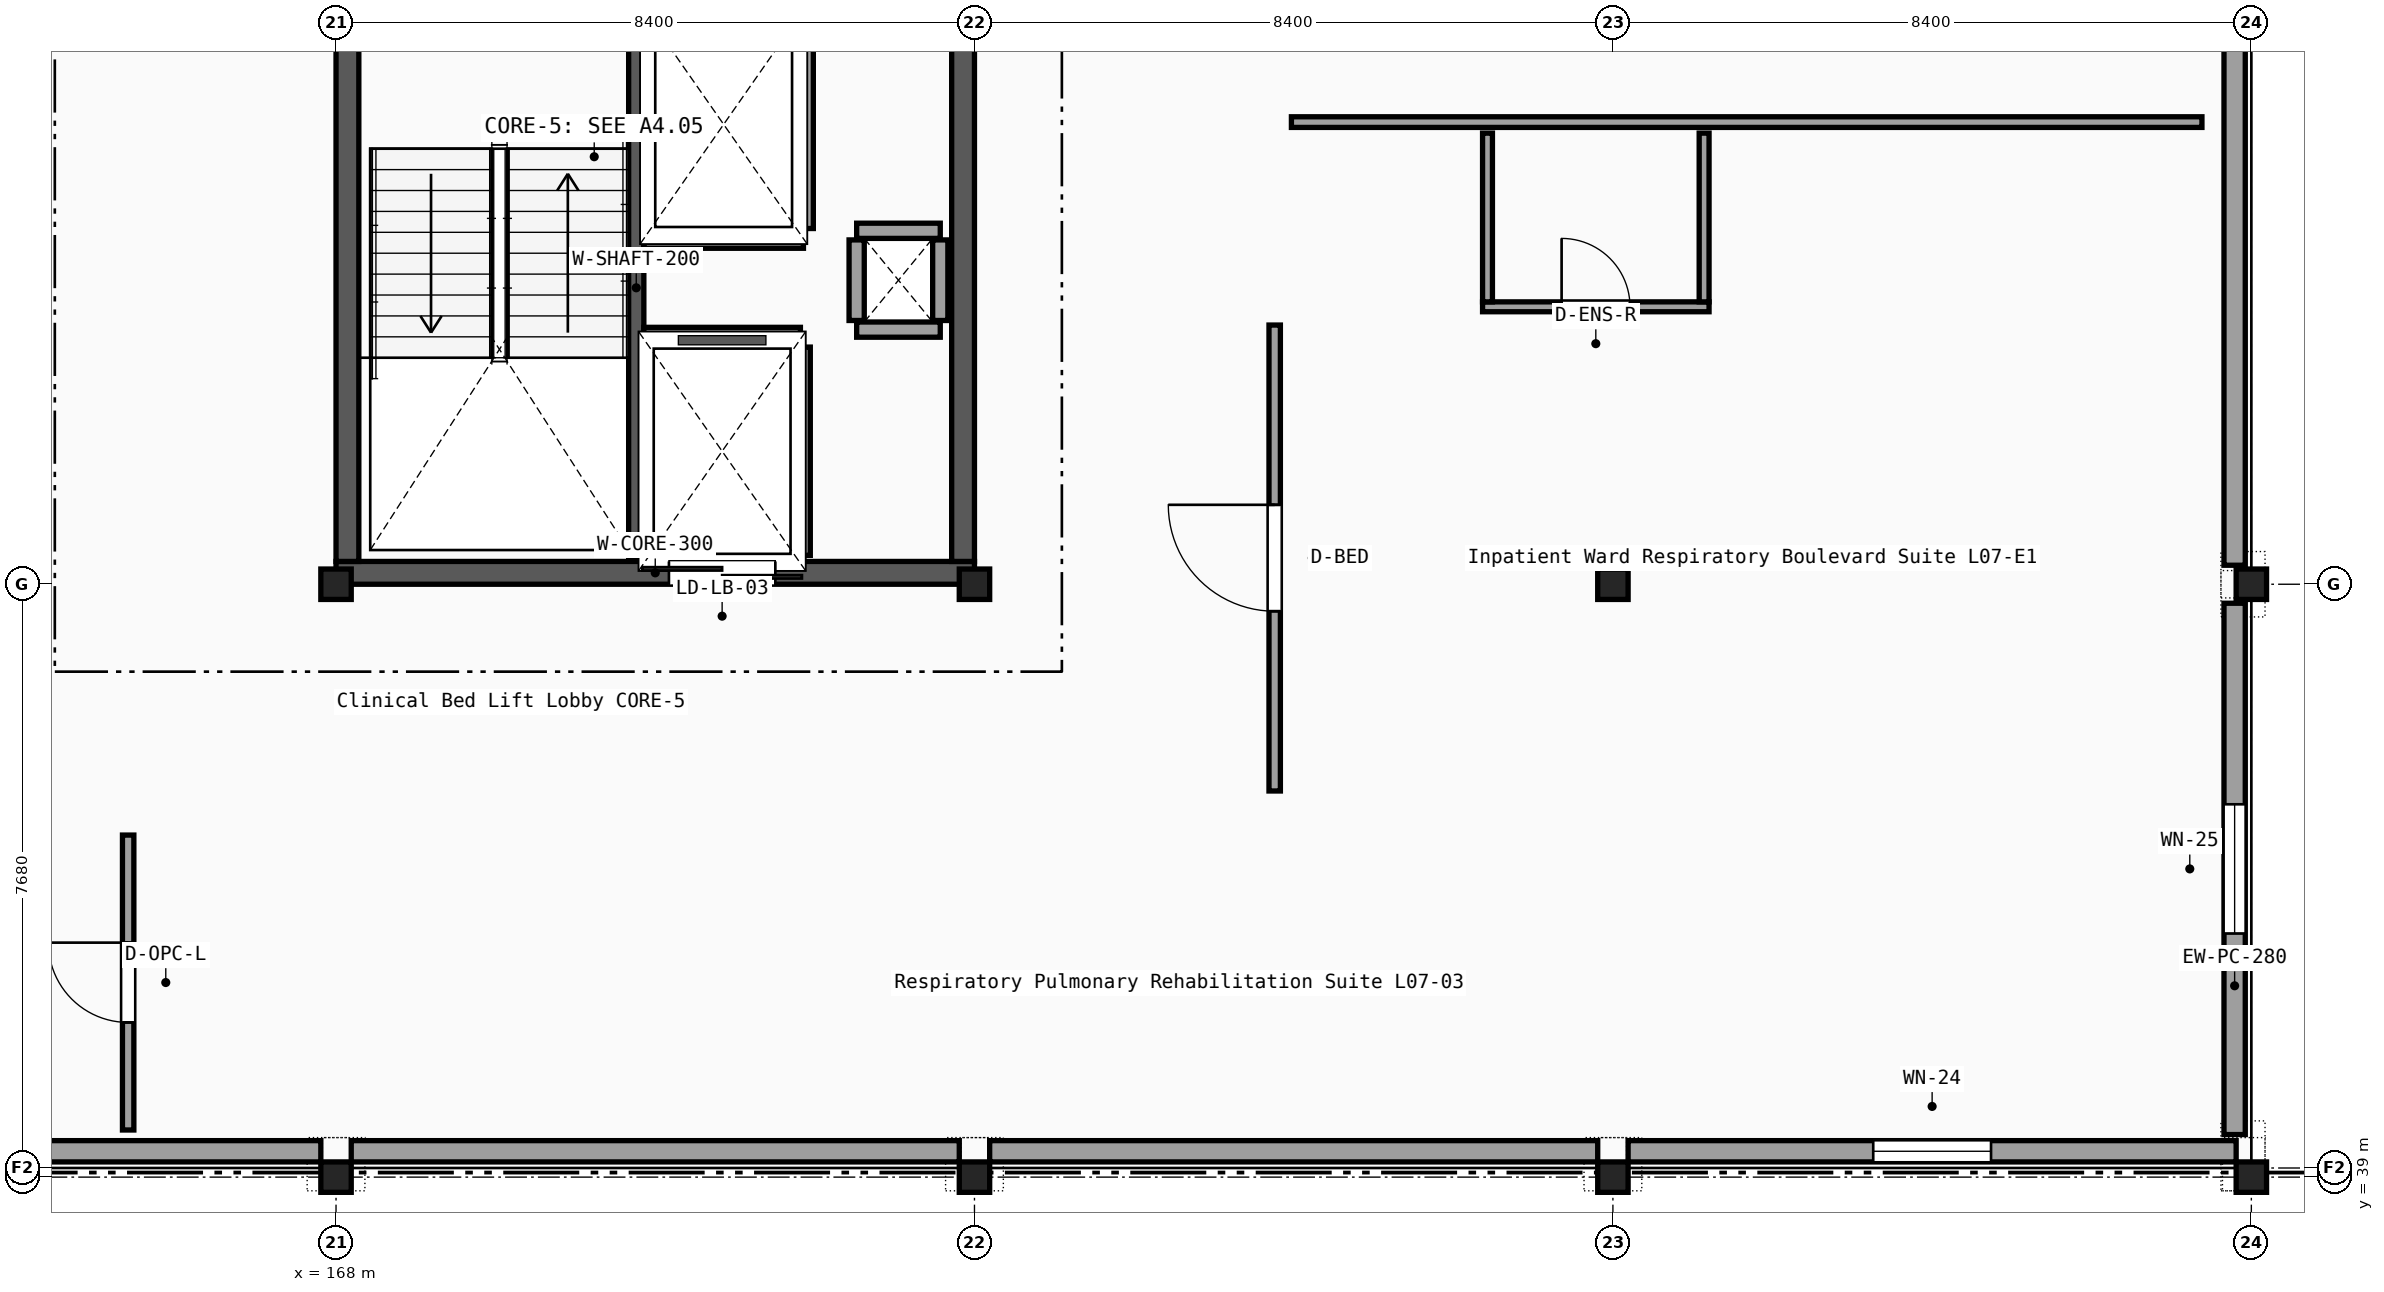
"""IFC4 building model, lengths in metres.
Left out: names, types, materials, properties, quantities, classifications, styles, units other than length and angle.
Written with IfcOpenShell. Run it as: python <this file> out.ifc"""

import sys

from ifc_helpers import new_model, si_unit, direction, frame, frame_2d, origin, origin_2d, place, context, subcontext, project, spatial, rectangle, i_section, extrude, element, fill, save


model = new_model("IFC4")
c1 = context("Model", 3, precision=1e-05, world=origin(), true_north=direction((0.0, 1.0)))
c2 = subcontext(c1, "Body", "Model", "MODEL_VIEW")
j1 = project(units=[si_unit("LENGTHUNIT", "METRE"), si_unit("PLANEANGLEUNIT", "RADIAN")], contexts=[c1])
p1 = place(None, origin())
s1 = spatial("IfcSite", under=j1, at=p1, CompositionType="ELEMENT")
p2 = place(p1, origin())
s2 = spatial("IfcBuilding", under=s1, at=p2, CompositionType="ELEMENT")
p3 = place(p2, frame((0.0, 0.0, 31.05)))
s3 = spatial("IfcBuildingStorey", under=s2, at=p3, CompositionType="ELEMENT", Elevation=31.05)
for number, where, z_axis, x_axis in (
    (1, (168.0, 39.0, 0.0), (0.0, 0.0, 1.0), (1.0, 0.0, 0.0)),
    (2, (168.0, 46.8, 0.0), (0.0, 0.0, 1.0), (1.0, 0.0, 0.0)),
    (3, (176.4, 39.0, 0.0), (0.0, 0.0, 1.0), (1.0, 0.0, 0.0)),
    (4, (176.4, 46.8, 0.0), (0.0, 0.0, 1.0), (1.0, 0.0, 0.0)),
    (5, (184.8, 39.0, 0.0), (0.0, 0.0, 1.0), (1.0, 0.0, 0.0)),
    (6, (184.8, 46.8, 0.0), (0.0, 0.0, 1.0), (1.0, 0.0, 0.0)),
    (7, (193.2, 39.0, 0.0), (0.0, 0.0, 1.0), (1.0, 0.0, 0.0)),
    (8, (193.2, 46.8, 0.0), (0.0, 0.0, 1.0), (1.0, 0.0, 0.0)),
):
    element("IfcColumn", number, at=place(p3, frame(where, z_axis=z_axis, x_axis=x_axis)), inside=s3, PredefinedType="COLUMN", context=c2, shape_type="SweptSolid", body=[
        extrude(i_section(OverallWidth=0.3, OverallDepth=0.4, WebThickness=0.013, FlangeThickness=0.024, FilletRadius=0.027, at=origin_2d()), origin(), (0.0, 0.0, 1.0), 4.05),
    ])
p4 = place(p3, frame((159.925, 39.34, 0.0), z_axis=(0.0, 0.0, 1.0), x_axis=(1.0, 0.0, 0.0)))
e9 = element("IfcWall", 9, at=p4, inside=s3, PredefinedType="SOLIDWALL", context=c2, shape_type="SweptSolid", body=[
    extrude(rectangle(XDim=7.875, YDim=0.28, at=frame_2d((3.938, 0.0))), origin(), (0.0, 0.0, 1.0), 3.34),
])
for number, where, z_axis, x_axis in (
    (10, (168.2, 39.34, 0.0), (0.0, 0.0, 1.0), (1.0, 0.0, 0.0)),
    (11, (176.6, 39.34, 0.0), (0.0, 0.0, 1.0), (1.0, 0.0, 0.0)),
):
    element("IfcWall", number, at=place(p3, frame(where, z_axis=z_axis, x_axis=x_axis)), inside=s3, PredefinedType="SOLIDWALL", context=c2, shape_type="SweptSolid", body=[
        extrude(rectangle(XDim=8.0, YDim=0.28, at=frame_2d((4.0, 0.0))), origin(), (0.0, 0.0, 1.0), 3.34),
    ])
p5 = place(p3, frame((185.0, 39.34, 0.0), z_axis=(0.0, 0.0, 1.0), x_axis=(1.0, 0.0, 0.0)))
e12 = element("IfcWall", 12, at=p5, inside=s3, PredefinedType="SOLIDWALL", context=c2, shape_type="SweptSolid", body=[
    extrude(rectangle(XDim=8.0, YDim=0.28, at=frame_2d((4.0, 0.0))), origin(), (0.0, 0.0, 1.0), 3.34),
])
p6 = place(p5, frame((3.225, 0.0, 0.8)))
e13 = element("IfcOpeningElement", 13, at=p6, cuts=e12, PredefinedType="OPENING", context=c2, shape_type="SweptSolid", body=[
    extrude(rectangle(XDim=1.55, YDim=1.7, at=frame_2d((0.775, 0.85))), frame((0.0, 0.15, 0.0), z_axis=(0.0, -1.0, 0.0), x_axis=(1.0, 0.0, 0.0)), (0.0, 0.0, 1.0), 0.3),
])
p7 = place(p3, frame((192.98, 39.56, 0.0), z_axis=(0.0, 0.0, 1.0), x_axis=(0.0, 1.0, 0.0)))
e14 = element("IfcWall", 14, at=p7, inside=s3, PredefinedType="SOLIDWALL", context=c2, shape_type="SweptSolid", body=[
    extrude(rectangle(XDim=6.99, YDim=0.28, at=frame_2d((3.495, 0.0))), origin(), (0.0, 0.0, 1.0), 3.44),
])
p8 = place(p7, frame((2.645, 0.0, 0.95)))
e15 = element("IfcOpeningElement", 15, at=p8, cuts=e14, PredefinedType="OPENING", context=c2, shape_type="SweptSolid", body=[
    extrude(rectangle(XDim=1.7, YDim=1.55, at=frame_2d((0.85, 0.775))), frame((0.0, 0.15, 0.0), z_axis=(0.0, -1.0, 0.0), x_axis=(1.0, 0.0, 0.0)), (0.0, 0.0, 1.0), 0.3),
])
p9 = place(p3, frame((192.98, 47.05, 0.0), z_axis=(0.0, 0.0, 1.0), x_axis=(0.0, 1.0, 0.0)))
e16 = element("IfcWall", 16, at=p9, inside=s3, PredefinedType="SOLIDWALL", context=c2, shape_type="SweptSolid", body=[
    extrude(rectangle(XDim=7.3, YDim=0.28, at=frame_2d((3.65, 0.0))), origin(), (0.0, 0.0, 1.0), 3.44),
])
p10 = place(p3, frame((168.0, 46.95, 0.0), z_axis=(0.0, 0.0, 1.0), x_axis=(1.0, 0.0, 0.0)))
e17 = element("IfcWall", 17, at=p10, inside=s3, PredefinedType="SHEAR", context=c2, shape_type="SweptSolid", body=[
    extrude(rectangle(XDim=8.4, YDim=0.3, at=frame_2d((4.2, 0.0))), origin(), (0.0, 0.0, 1.0), 3.81),
])
p11 = place(p10, frame((4.38, 0.0, 0.0)))
e18 = element("IfcOpeningElement", 18, at=p11, cuts=e17, PredefinedType="OPENING", context=c2, shape_type="SweptSolid", body=[
    extrude(rectangle(XDim=1.4, YDim=2.2, at=frame_2d((0.7, 1.1))), frame((0.0, 0.16, 0.0), z_axis=(0.0, -1.0, 0.0), x_axis=(1.0, 0.0, 0.0)), (0.0, 0.0, 1.0), 0.32),
])
for number, where, z_axis, x_axis in (
    (19, (168.15, 47.1, 0.0), (0.0, 0.0, 1.0), (0.0, 1.0, 0.0)),
    (20, (176.25, 47.1, 0.0), (0.0, 0.0, 1.0), (0.0, 1.0, 0.0)),
):
    element("IfcWall", number, at=place(p3, frame(where, z_axis=z_axis, x_axis=x_axis)), inside=s3, PredefinedType="SHEAR", context=c2, shape_type="SweptSolid", body=[
        extrude(rectangle(XDim=7.2, YDim=0.3, at=frame_2d((3.6, 0.0))), origin(), (0.0, 0.0, 1.0), 3.81),
    ])
p12 = place(p3, frame((171.95, 47.12, 0.0), z_axis=(0.0, 0.0, 1.0), x_axis=(0.0, 1.0, 0.0)))
e21 = element("IfcWall", 21, at=p12, inside=s3, PredefinedType="SHEAR", context=c2, shape_type="SweptSolid", body=[
    extrude(rectangle(XDim=7.16, YDim=0.2, at=frame_2d((3.58, 0.0))), origin(), (0.0, 0.0, 1.0), 3.81),
])
for number, where, z_axis, x_axis in (
    (22, (174.85, 50.15, 0.0), (0.0, 0.0, 1.0), (1.0, 0.0, 0.0)),
    (23, (174.85, 51.45, 0.0), (0.0, 0.0, 1.0), (1.0, 0.0, 0.0)),
):
    element("IfcWall", number, at=place(p3, frame(where, z_axis=z_axis, x_axis=x_axis)), inside=s3, PredefinedType="PARTITIONING", context=c2, shape_type="SweptSolid", body=[
        extrude(rectangle(XDim=1.1, YDim=0.2, at=frame_2d((0.55, 0.0))), origin(), (0.0, 0.0, 1.0), 3.34),
    ])
for number, where, z_axis, x_axis in (
    (24, (174.85, 50.27, 0.0), (0.0, 0.0, 1.0), (0.0, 1.0, 0.0)),
    (25, (175.95, 50.27, 0.0), (0.0, 0.0, 1.0), (0.0, 1.0, 0.0)),
):
    element("IfcWall", number, at=place(p3, frame(where, z_axis=z_axis, x_axis=x_axis)), inside=s3, PredefinedType="PARTITIONING", context=c2, shape_type="SweptSolid", body=[
        extrude(rectangle(XDim=1.06, YDim=0.2, at=frame_2d((0.53, 0.0))), origin(), (0.0, 0.0, 1.0), 3.34),
    ])
p13 = place(p3, frame((174.18, 51.48, 0.0), z_axis=(0.0, 0.0, 1.0), x_axis=(0.0, 1.0, 0.0)))
e26 = element("IfcWall", 26, at=p13, inside=s3, PredefinedType="PARTITIONING", context=c2, shape_type="SweptSolid", body=[
    extrude(rectangle(XDim=2.74, YDim=0.2, at=frame_2d((1.37, 0.0))), origin(), (0.0, 0.0, 1.0), 3.34),
])
p14 = place(p3, frame((172.05, 51.32, 0.0), z_axis=(0.0, 0.0, 1.0), x_axis=(1.0, 0.0, 0.0)))
e27 = element("IfcWall", 27, at=p14, inside=s3, PredefinedType="PARTITIONING", context=c2, shape_type="SweptSolid", body=[
    extrude(rectangle(XDim=2.1, YDim=0.2, at=frame_2d((1.05, 0.0))), origin(), (0.0, 0.0, 1.0), 3.34),
])
p15 = place(p3, frame((174.14, 47.18, 0.0), z_axis=(0.0, 0.0, 1.0), x_axis=(0.0, 1.0, 0.0)))
e28 = element("IfcWall", 28, at=p15, inside=s3, PredefinedType="PARTITIONING", context=c2, shape_type="SweptSolid", body=[
    extrude(rectangle(XDim=2.74, YDim=0.2, at=frame_2d((1.37, 0.0))), origin(), (0.0, 0.0, 1.0), 3.34),
])
p16 = place(p3, frame((172.05, 50.08, 0.0), z_axis=(0.0, 0.0, 1.0), x_axis=(1.0, 0.0, 0.0)))
e29 = element("IfcWall", 29, at=p16, inside=s3, PredefinedType="PARTITIONING", context=c2, shape_type="SweptSolid", body=[
    extrude(rectangle(XDim=2.06, YDim=0.2, at=frame_2d((1.03, 0.0))), origin(), (0.0, 0.0, 1.0), 3.34),
])
p17 = place(p3, frame((165.265, 39.62, 0.0), z_axis=(0.0, 0.0, 1.0), x_axis=(0.0, 1.0, 0.0)))
e30 = element("IfcWall", 30, at=p17, inside=s3, PredefinedType="PARTITIONING", context=c2, shape_type="SweptSolid", body=[
    extrude(rectangle(XDim=3.88, YDim=0.15, at=frame_2d((1.94, 0.0))), origin(), (0.0, 0.0, 1.0), 3.77),
])
p18 = place(p17, frame((1.415, 0.0, 0.0)))
e31 = element("IfcOpeningElement", 31, at=p18, cuts=e30, PredefinedType="OPENING", context=c2, shape_type="SweptSolid", body=[
    extrude(rectangle(XDim=1.05, YDim=2.15, at=frame_2d((0.525, 1.075))), frame((0.0, 0.085, 0.0), z_axis=(0.0, -1.0, 0.0), x_axis=(1.0, 0.0, 0.0)), (0.0, 0.0, 1.0), 0.17),
])
p19 = place(p3, frame((180.35, 44.08, 0.0), z_axis=(0.0, 0.0, 1.0), x_axis=(0.0, 1.0, 0.0)))
e32 = element("IfcWall", 32, at=p19, inside=s3, PredefinedType="PARTITIONING", context=c2, shape_type="SweptSolid", body=[
    extrude(rectangle(XDim=6.13, YDim=0.15, at=frame_2d((3.065, 0.0))), origin(), (0.0, 0.0, 1.0), 3.34),
])
p20 = place(p19, frame((2.365, 0.0, 0.0)))
e33 = element("IfcOpeningElement", 33, at=p20, cuts=e32, PredefinedType="OPENING", context=c2, shape_type="SweptSolid", body=[
    extrude(rectangle(XDim=1.4, YDim=2.2, at=frame_2d((0.7, 1.1))), frame((0.0, 0.085, 0.0), z_axis=(0.0, -1.0, 0.0), x_axis=(1.0, 0.0, 0.0)), (0.0, 0.0, 1.0), 0.17),
])
p21 = place(p3, frame((180.57, 52.88, 0.0), z_axis=(0.0, 0.0, 1.0), x_axis=(1.0, 0.0, 0.0)))
e34 = element("IfcWall", 34, at=p21, inside=s3, PredefinedType="PARTITIONING", context=c2, shape_type="SweptSolid", body=[
    extrude(rectangle(XDim=11.98, YDim=0.14, at=frame_2d((5.99, 0.0))), origin(), (0.0, 0.0, 1.0), 3.55),
])
p22 = place(p3, frame((183.085, 50.45, 0.0), z_axis=(0.0, 0.0, 1.0), x_axis=(1.0, 0.0, 0.0)))
e35 = element("IfcWall", 35, at=p22, inside=s3, PredefinedType="PARTITIONING", context=c2, shape_type="SweptSolid", body=[
    extrude(rectangle(XDim=2.98, YDim=0.13, at=frame_2d((1.49, 0.0))), origin(), (0.0, 0.0, 1.0), 3.55),
])
p23 = place(p22, frame((1.04, 0.0, 0.0)))
e36 = element("IfcOpeningElement", 36, at=p23, cuts=e35, PredefinedType="OPENING", context=c2, shape_type="SweptSolid", body=[
    extrude(rectangle(XDim=0.9, YDim=2.1, at=frame_2d((0.45, 1.05))), frame((0.0, 0.075, 0.0), z_axis=(0.0, -1.0, 0.0), x_axis=(1.0, 0.0, 0.0)), (0.0, 0.0, 1.0), 0.15),
])
for number, where, z_axis, x_axis in (
    (37, (183.15, 50.515, 0.0), (0.0, 0.0, 1.0), (0.0, 1.0, 0.0)),
    (38, (186.0, 50.515, 0.0), (0.0, 0.0, 1.0), (0.0, 1.0, 0.0)),
):
    element("IfcWall", number, at=place(p3, frame(where, z_axis=z_axis, x_axis=x_axis)), inside=s3, PredefinedType="PARTITIONING", context=c2, shape_type="SweptSolid", body=[
        extrude(rectangle(XDim=2.22, YDim=0.13, at=frame_2d((1.11, 0.0))), origin(), (0.0, 0.0, 1.0), 3.77),
    ])
p24 = place(p6, origin())
e39 = element("IfcWindow", 39, at=p24, inside=s3, PartitioningType="SINGLE_PANEL", PredefinedType="WINDOW", context=c2, shape_type="SweptSolid", body=[
    extrude(rectangle(XDim=1.55, YDim=1.7, at=frame_2d((0.775, 0.85))), frame((0.0, 0.03, 0.0), z_axis=(0.0, -1.0, 0.0), x_axis=(1.0, 0.0, 0.0)), (0.0, 0.0, 1.0), 0.06),
])
fill(e13, e39)
p25 = place(p8, origin())
e40 = element("IfcWindow", 40, at=p25, inside=s3, PartitioningType="SINGLE_PANEL", PredefinedType="WINDOW", context=c2, shape_type="SweptSolid", body=[
    extrude(rectangle(XDim=1.7, YDim=1.55, at=frame_2d((0.85, 0.775))), frame((0.0, 0.03, 0.0), z_axis=(0.0, -1.0, 0.0), x_axis=(1.0, 0.0, 0.0)), (0.0, 0.0, 1.0), 0.06),
])
fill(e15, e40)
p26 = place(p11, origin())
e41 = element("IfcDoor", 41, at=p26, inside=s3, OperationType="DOUBLE_DOOR_SLIDING", PredefinedType="DOOR", context=c2, shape_type="SweptSolid", body=[
    extrude(rectangle(XDim=1.4, YDim=2.2, at=frame_2d((0.7, 1.1))), frame((0.0, 0.025, 0.0), z_axis=(0.0, -1.0, 0.0), x_axis=(1.0, 0.0, 0.0)), (0.0, 0.0, 1.0), 0.05),
])
fill(e18, e41)
p27 = place(p18, origin())
e42 = element("IfcDoor", 42, at=p27, inside=s3, OperationType="SINGLE_SWING_RIGHT", PredefinedType="DOOR", context=c2, shape_type="SweptSolid", body=[
    extrude(rectangle(XDim=1.05, YDim=2.15, at=frame_2d((0.525, 1.075))), frame((0.0, 0.025, 0.0), z_axis=(0.0, -1.0, 0.0), x_axis=(1.0, 0.0, 0.0)), (0.0, 0.0, 1.0), 0.05),
])
fill(e31, e42)
p28 = place(p20, origin())
e43 = element("IfcDoor", 43, at=p28, inside=s3, OperationType="SINGLE_SWING_RIGHT", PredefinedType="DOOR", context=c2, shape_type="SweptSolid", body=[
    extrude(rectangle(XDim=1.4, YDim=2.2, at=frame_2d((0.7, 1.1))), frame((0.0, 0.025, 0.0), z_axis=(0.0, -1.0, 0.0), x_axis=(1.0, 0.0, 0.0)), (0.0, 0.0, 1.0), 0.05),
])
fill(e33, e43)
p29 = place(p23, origin())
e44 = element("IfcDoor", 44, at=p29, inside=s3, OperationType="SINGLE_SWING_LEFT", PredefinedType="DOOR", context=c2, shape_type="SweptSolid", body=[
    extrude(rectangle(XDim=0.9, YDim=2.1, at=frame_2d((0.45, 1.05))), frame((0.0, 0.025, 0.0), z_axis=(0.0, -1.0, 0.0), x_axis=(1.0, 0.0, 0.0)), (0.0, 0.0, 1.0), 0.05),
])
fill(e36, e44)
save(model, sys.argv[1])
